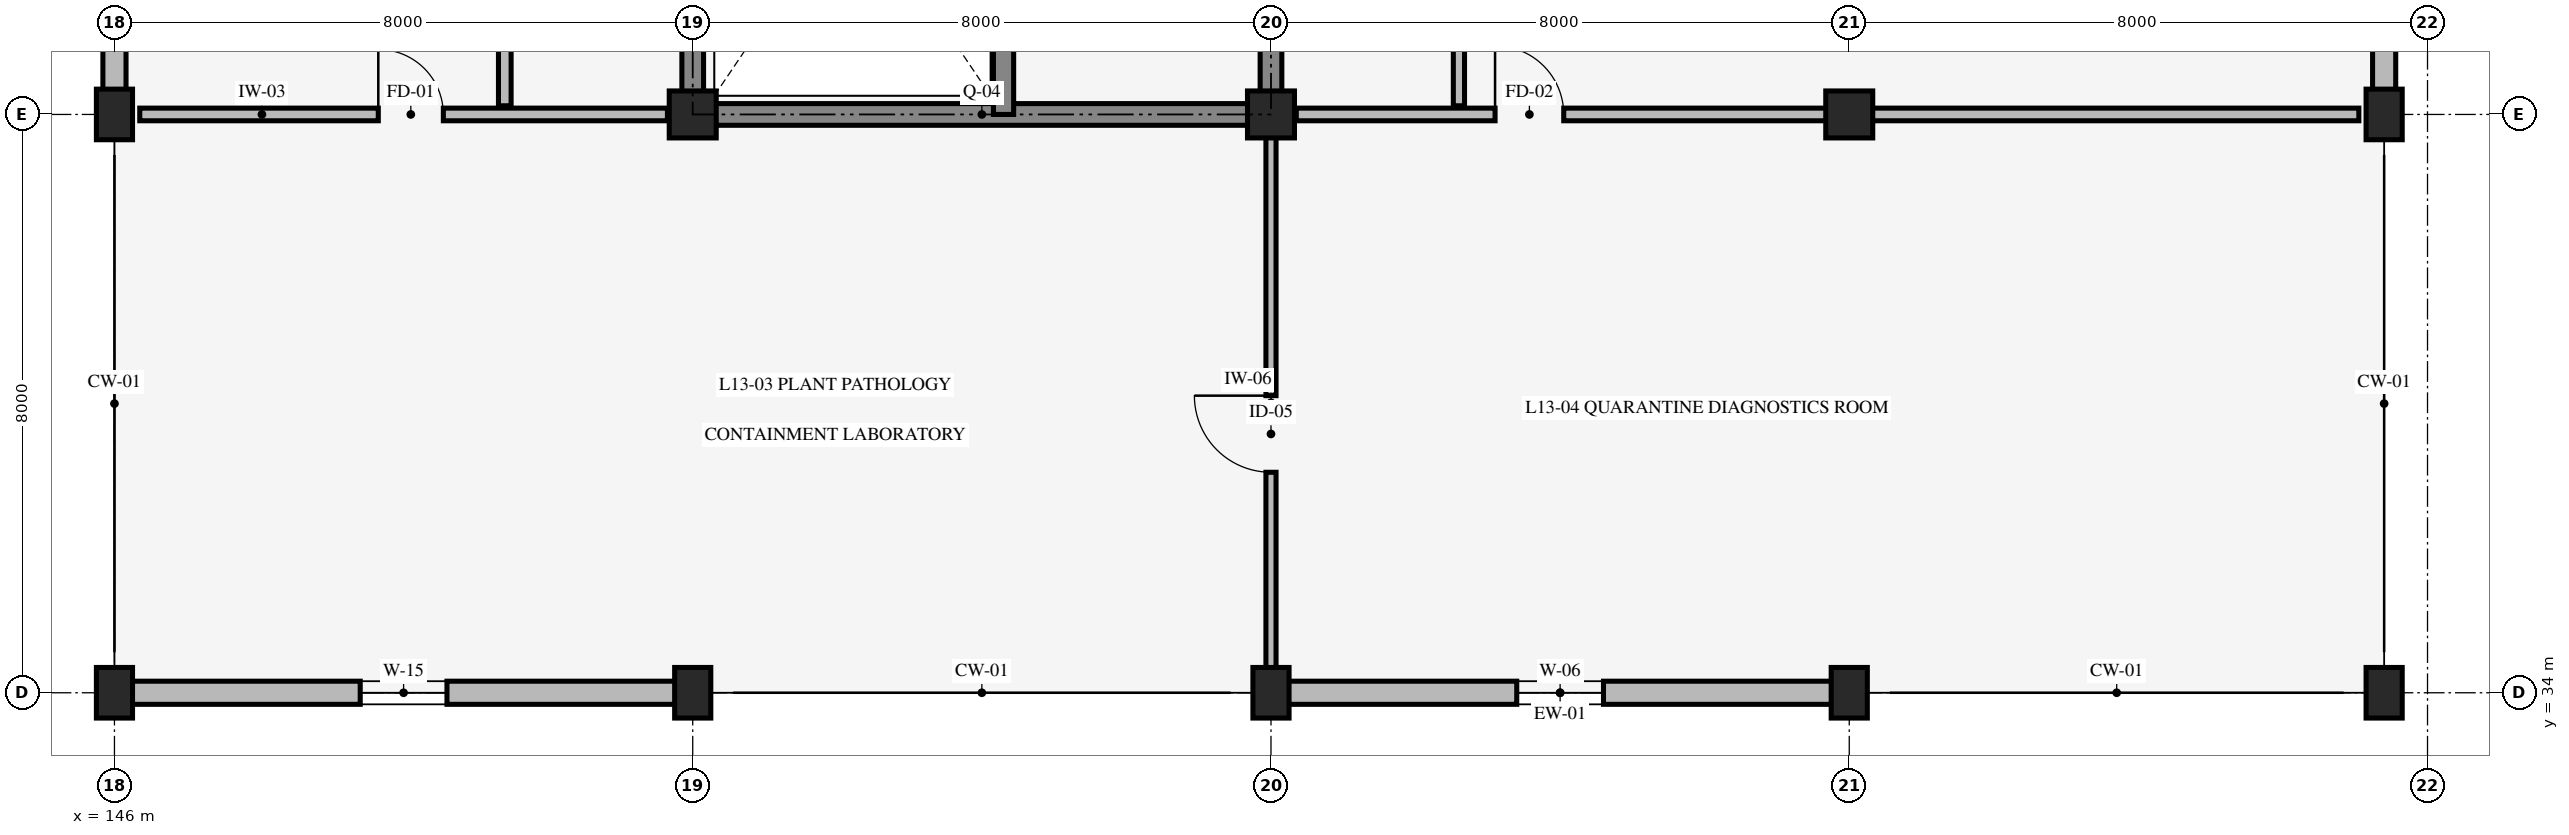
"""IFC4 building model, lengths in metres.
Left out: names, types, materials, properties, quantities, classifications, styles, units other than length and angle.
Written with IfcOpenShell. Run it as: python <this file> out.ifc"""

import sys

from ifc_helpers import new_model, si_unit, direction, frame, frame_2d, origin, origin_2d, place, context, subcontext, project, spatial, rectangle, extrude, element, fill, save


model = new_model("IFC4")
c1 = context("Model", 3, precision=1e-05, world=origin(), true_north=direction((0.0, 1.0)))
c2 = subcontext(c1, "Body", "Model", "MODEL_VIEW")
j1 = project(units=[si_unit("LENGTHUNIT", "METRE"), si_unit("PLANEANGLEUNIT", "RADIAN")], contexts=[c1])
p1 = place(None, origin())
s1 = spatial("IfcSite", under=j1, at=p1, CompositionType="ELEMENT")
p2 = place(p1, origin())
s2 = spatial("IfcBuilding", under=s1, at=p2, CompositionType="ELEMENT")
p3 = place(p2, frame((0.0, 0.0, 52.8)))
s3 = spatial("IfcBuildingStorey", under=s2, at=p3, CompositionType="ELEMENT", Elevation=52.8)
p4 = place(p3, frame((154.0, 42.0, 0.0), z_axis=(0.0, 0.0, 1.0), x_axis=(1.0, 0.0, 0.0)))
e1 = element("IfcWall", 1, at=p4, inside=s3, PredefinedType="SHEAR", context=c2, shape_type="SweptSolid", body=[
    extrude(rectangle(XDim=8.0, YDim=0.3, at=frame_2d((4.0, 0.0))), origin(), (0.0, 0.0, 1.0), 3.95),
])
p5 = place(p3, frame((162.0, 42.0, 0.0), z_axis=(0.0, 0.0, 1.0), x_axis=(0.0, 1.0, 0.0)))
e2 = element("IfcWall", 2, at=p5, inside=s3, PredefinedType="SHEAR", context=c2, shape_type="SweptSolid", body=[
    extrude(rectangle(XDim=8.0, YDim=0.3, at=frame_2d((4.0, 0.0))), origin(), (0.0, 0.0, 1.0), 3.95),
])
p6 = place(p5, frame((3.175, 0.0, 0.0)))
e3 = element("IfcOpeningElement", 3, at=p6, cuts=e2, PredefinedType="OPENING", context=c2, shape_type="SweptSolid", body=[
    extrude(rectangle(XDim=1.05, YDim=2.2, at=frame_2d((0.525, 1.1))), frame((0.0, 0.16, 0.0), z_axis=(0.0, -1.0, 0.0), x_axis=(1.0, 0.0, 0.0)), (0.0, 0.0, 1.0), 0.32),
])
p7 = place(p3, frame((154.0, 50.0, 0.0), z_axis=(0.0, 0.0, 1.0), x_axis=(0.0, -1.0, 0.0)))
e4 = element("IfcWall", 4, at=p7, inside=s3, PredefinedType="SHEAR", context=c2, shape_type="SweptSolid", body=[
    extrude(rectangle(XDim=8.0, YDim=0.3, at=frame_2d((4.0, 0.0))), origin(), (0.0, 0.0, 1.0), 3.95),
])
p8 = place(p3, frame((158.3, 42.0, 0.0), z_axis=(0.0, 0.0, 1.0), x_axis=(0.0, 1.0, 0.0)))
e5 = element("IfcWall", 5, at=p8, inside=s3, PredefinedType="SHEAR", context=c2, shape_type="SweptSolid", body=[
    extrude(rectangle(XDim=8.0, YDim=0.28, at=frame_2d((4.0, 0.0))), origin(), (0.0, 0.0, 1.0), 3.95),
])
for number, where, z_axis, x_axis in (
    (6, (146.0, 34.0, 0.0), (0.0, 0.0, 1.0), (1.0, 0.0, 0.0)),
    (7, (146.0, 42.0, 0.0), (0.0, 0.0, 1.0), (1.0, 0.0, 0.0)),
    (8, (154.0, 34.0, 0.0), (0.0, 0.0, 1.0), (1.0, 0.0, 0.0)),
):
    element("IfcColumn", number, at=place(p3, frame(where, z_axis=z_axis, x_axis=x_axis)), inside=s3, PredefinedType="COLUMN", context=c2, shape_type="SweptSolid", body=[
        extrude(rectangle(XDim=0.5, YDim=0.7, at=origin_2d()), origin(), (0.0, 0.0, 1.0), 4.2),
    ])
p9 = place(p3, frame((154.0, 42.0, 0.0), z_axis=(0.0, 0.0, 1.0), x_axis=(1.0, 0.0, 0.0)))
e9 = element("IfcColumn", 9, at=p9, inside=s3, PredefinedType="COLUMN", context=c2, shape_type="SweptSolid", body=[
    extrude(rectangle(XDim=0.65, YDim=0.65, at=origin_2d()), origin(), (0.0, 0.0, 1.0), 4.2),
])
p10 = place(p3, frame((162.0, 34.0, 0.0), z_axis=(0.0, 0.0, 1.0), x_axis=(1.0, 0.0, 0.0)))
e10 = element("IfcColumn", 10, at=p10, inside=s3, PredefinedType="COLUMN", context=c2, shape_type="SweptSolid", body=[
    extrude(rectangle(XDim=0.5, YDim=0.7, at=origin_2d()), origin(), (0.0, 0.0, 1.0), 4.2),
])
p11 = place(p3, frame((162.0, 42.0, 0.0), z_axis=(0.0, 0.0, 1.0), x_axis=(1.0, 0.0, 0.0)))
e11 = element("IfcColumn", 11, at=p11, inside=s3, PredefinedType="COLUMN", context=c2, shape_type="SweptSolid", body=[
    extrude(rectangle(XDim=0.65, YDim=0.65, at=origin_2d()), origin(), (0.0, 0.0, 1.0), 4.2),
])
p12 = place(p3, frame((170.0, 34.0, 0.0), z_axis=(0.0, 0.0, 1.0), x_axis=(1.0, 0.0, 0.0)))
e12 = element("IfcColumn", 12, at=p12, inside=s3, PredefinedType="COLUMN", context=c2, shape_type="SweptSolid", body=[
    extrude(rectangle(XDim=0.5, YDim=0.7, at=origin_2d()), origin(), (0.0, 0.0, 1.0), 4.2),
])
p13 = place(p3, frame((170.0, 42.0, 0.0), z_axis=(0.0, 0.0, 1.0), x_axis=(1.0, 0.0, 0.0)))
e13 = element("IfcColumn", 13, at=p13, inside=s3, PredefinedType="COLUMN", context=c2, shape_type="SweptSolid", body=[
    extrude(rectangle(XDim=0.65, YDim=0.65, at=origin_2d()), origin(), (0.0, 0.0, 1.0), 4.2),
])
for number, where, z_axis, x_axis in (
    (14, (177.4, 34.0, 0.0), (0.0, 0.0, 1.0), (1.0, 0.0, 0.0)),
    (15, (177.4, 42.0, 0.0), (0.0, 0.0, 1.0), (1.0, 0.0, 0.0)),
):
    element("IfcColumn", number, at=place(p3, frame(where, z_axis=z_axis, x_axis=x_axis)), inside=s3, PredefinedType="COLUMN", context=c2, shape_type="SweptSolid", body=[
        extrude(rectangle(XDim=0.5, YDim=0.7, at=origin_2d()), origin(), (0.0, 0.0, 1.0), 4.2),
    ])
p14 = place(p3, frame((170.0, 34.0, 0.0), z_axis=(0.0, 0.0, 1.0), x_axis=(-1.0, 0.0, 0.0)))
e16 = element("IfcWall", 16, at=p14, inside=s3, PredefinedType="STANDARD", context=c2, shape_type="SweptSolid", body=[
    extrude(rectangle(XDim=8.0, YDim=0.32, at=frame_2d((4.0, 0.0))), origin(), (0.0, 0.0, 1.0), 3.4),
])
p15 = place(p14, frame((3.4, 0.0, 0.85)))
e17 = element("IfcOpeningElement", 17, at=p15, cuts=e16, PredefinedType="OPENING", context=c2, shape_type="SweptSolid", body=[
    extrude(rectangle(XDim=1.2, YDim=1.2, at=frame_2d((0.6, 0.6))), frame((0.0, 0.17, 0.0), z_axis=(0.0, -1.0, 0.0), x_axis=(1.0, 0.0, 0.0)), (0.0, 0.0, 1.0), 0.34),
])
p16 = place(p3, frame((154.0, 34.0, 0.0), z_axis=(0.0, 0.0, 1.0), x_axis=(-1.0, 0.0, 0.0)))
e18 = element("IfcWall", 18, at=p16, inside=s3, PredefinedType="STANDARD", context=c2, shape_type="SweptSolid", body=[
    extrude(rectangle(XDim=8.0, YDim=0.32, at=frame_2d((4.0, 0.0))), origin(), (0.0, 0.0, 1.0), 3.4),
])
p17 = place(p16, frame((3.4, 0.0, 0.85)))
e19 = element("IfcOpeningElement", 19, at=p17, cuts=e18, PredefinedType="OPENING", context=c2, shape_type="SweptSolid", body=[
    extrude(rectangle(XDim=1.2, YDim=1.8, at=frame_2d((0.6, 0.9))), frame((0.0, 0.17, 0.0), z_axis=(0.0, -1.0, 0.0), x_axis=(1.0, 0.0, 0.0)), (0.0, 0.0, 1.0), 0.34),
])
p18 = place(p3, frame((146.0, 42.0, 0.0), z_axis=(0.0, 0.0, 1.0), x_axis=(0.0, 1.0, 0.0)))
e20 = element("IfcWall", 20, at=p18, inside=s3, PredefinedType="STANDARD", context=c2, shape_type="SweptSolid", body=[
    extrude(rectangle(XDim=8.0, YDim=0.32, at=frame_2d((4.0, 0.0))), origin(), (0.0, 0.0, 1.0), 3.34),
])
p19 = place(p18, frame((3.5, 0.0, 0.85)))
e21 = element("IfcOpeningElement", 21, at=p19, cuts=e20, PredefinedType="OPENING", context=c2, shape_type="SweptSolid", body=[
    extrude(rectangle(XDim=1.0, YDim=1.5, at=frame_2d((0.5, 0.75))), frame((0.0, 0.17, 0.0), z_axis=(0.0, -1.0, 0.0), x_axis=(1.0, 0.0, 0.0)), (0.0, 0.0, 1.0), 0.34),
])
p20 = place(p3, frame((177.4, 50.0, 0.0), z_axis=(0.0, 0.0, 1.0), x_axis=(0.0, -1.0, 0.0)))
e22 = element("IfcWall", 22, at=p20, inside=s3, PredefinedType="STANDARD", context=c2, shape_type="SweptSolid", body=[
    extrude(rectangle(XDim=8.0, YDim=0.32, at=frame_2d((4.0, 0.0))), origin(), (0.0, 0.0, 1.0), 3.34),
])
p21 = place(p20, frame((2.55, 0.0, 0.85)))
e23 = element("IfcOpeningElement", 23, at=p21, cuts=e22, PredefinedType="OPENING", context=c2, shape_type="SweptSolid", body=[
    extrude(rectangle(XDim=2.9, YDim=1.7, at=frame_2d((1.45, 0.85))), frame((0.0, 0.17, 0.0), z_axis=(0.0, -1.0, 0.0), x_axis=(1.0, 0.0, 0.0)), (0.0, 0.0, 1.0), 0.34),
])
p22 = place(p3, frame((151.4, 42.12, 0.0), z_axis=(0.0, 0.0, 1.0), x_axis=(0.0, 1.0, 0.0)))
e24 = element("IfcWall", 24, at=p22, inside=s3, PredefinedType="STANDARD", context=c2, shape_type="SweptSolid", body=[
    extrude(rectangle(XDim=7.76, YDim=0.175, at=frame_2d((3.88, 0.0))), origin(), (0.0, 0.0, 1.0), 3.9),
])
p23 = place(p22, frame((3.08, 0.0, 0.0)))
e25 = element("IfcOpeningElement", 25, at=p23, cuts=e24, PredefinedType="OPENING", context=c2, shape_type="SweptSolid", body=[
    extrude(rectangle(XDim=1.6, YDim=2.25, at=frame_2d((0.8, 1.125))), frame((0.0, 0.098, 0.0), z_axis=(0.0, -1.0, 0.0), x_axis=(1.0, 0.0, 0.0)), (0.0, 0.0, 1.0), 0.195),
])
p24 = place(p3, frame((164.6, 42.12, 0.0), z_axis=(0.0, 0.0, 1.0), x_axis=(0.0, 1.0, 0.0)))
e26 = element("IfcWall", 26, at=p24, inside=s3, PredefinedType="STANDARD", context=c2, shape_type="SweptSolid", body=[
    extrude(rectangle(XDim=7.8, YDim=0.155, at=frame_2d((3.9, 0.0))), origin(), (0.0, 0.0, 1.0), 3.9),
])
p25 = place(p24, frame((3.225, 0.0, 0.0)))
e27 = element("IfcOpeningElement", 27, at=p25, cuts=e26, PredefinedType="OPENING", context=c2, shape_type="SweptSolid", body=[
    extrude(rectangle(XDim=1.35, YDim=2.15, at=frame_2d((0.675, 1.075))), frame((0.0, 0.087, 0.0), z_axis=(0.0, -1.0, 0.0), x_axis=(1.0, 0.0, 0.0)), (0.0, 0.0, 1.0), 0.175),
])
p26 = place(p3, frame((146.35, 42.0, 0.0), z_axis=(0.0, 0.0, 1.0), x_axis=(1.0, 0.0, 0.0)))
e28 = element("IfcWall", 28, at=p26, inside=s3, PredefinedType="STANDARD", context=c2, shape_type="SweptSolid", body=[
    extrude(rectangle(XDim=7.3, YDim=0.175, at=frame_2d((3.65, 0.0))), origin(), (0.0, 0.0, 1.0), 3.19),
])
p27 = place(p26, frame((3.3, 0.0, 0.0)))
e29 = element("IfcOpeningElement", 29, at=p27, cuts=e28, PredefinedType="OPENING", context=c2, shape_type="SweptSolid", body=[
    extrude(rectangle(XDim=0.9, YDim=2.1, at=frame_2d((0.45, 1.05))), frame((0.0, 0.098, 0.0), z_axis=(0.0, -1.0, 0.0), x_axis=(1.0, 0.0, 0.0)), (0.0, 0.0, 1.0), 0.195),
])
p28 = place(p3, frame((162.0, 34.05, 0.0), z_axis=(0.0, 0.0, 1.0), x_axis=(0.0, 1.0, 0.0)))
e30 = element("IfcWall", 30, at=p28, inside=s3, PredefinedType="STANDARD", context=c2, shape_type="SweptSolid", body=[
    extrude(rectangle(XDim=7.83, YDim=0.14, at=frame_2d((3.915, 0.0))), origin(), (0.0, 0.0, 1.0), 3.9),
])
p29 = place(p28, frame((3.0, 0.0, 0.0)))
e31 = element("IfcOpeningElement", 31, at=p29, cuts=e30, PredefinedType="OPENING", context=c2, shape_type="SweptSolid", body=[
    extrude(rectangle(XDim=1.06, YDim=2.12, at=frame_2d((0.53, 1.06))), frame((0.0, 0.08, 0.0), z_axis=(0.0, -1.0, 0.0), x_axis=(1.0, 0.0, 0.0)), (0.0, 0.0, 1.0), 0.16),
])
p30 = place(p3, frame((162.35, 42.0, 0.0), z_axis=(0.0, 0.0, 1.0), x_axis=(1.0, 0.0, 0.0)))
e32 = element("IfcWall", 32, at=p30, inside=s3, PredefinedType="STANDARD", context=c2, shape_type="SweptSolid", body=[
    extrude(rectangle(XDim=14.7, YDim=0.175, at=frame_2d((7.35, 0.0))), origin(), (0.0, 0.0, 1.0), 3.29),
])
p31 = place(p30, frame((2.75, 0.0, 0.0)))
e33 = element("IfcOpeningElement", 33, at=p31, cuts=e32, PredefinedType="OPENING", context=c2, shape_type="SweptSolid", body=[
    extrude(rectangle(XDim=0.95, YDim=2.1, at=frame_2d((0.475, 1.05))), frame((0.0, 0.098, 0.0), z_axis=(0.0, -1.0, 0.0), x_axis=(1.0, 0.0, 0.0)), (0.0, 0.0, 1.0), 0.195),
])
p32 = place(p15, origin())
e34 = element("IfcWindow", 34, at=p32, inside=s3, PartitioningType="SINGLE_PANEL", PredefinedType="WINDOW", context=c2, shape_type="SweptSolid", body=[
    extrude(rectangle(XDim=1.2, YDim=1.2, at=frame_2d((0.6, 0.6))), frame((0.0, 0.03, 0.0), z_axis=(0.0, -1.0, 0.0), x_axis=(1.0, 0.0, 0.0)), (0.0, 0.0, 1.0), 0.06),
])
fill(e17, e34)
p33 = place(p17, origin())
e35 = element("IfcWindow", 35, at=p33, inside=s3, PartitioningType="SINGLE_PANEL", PredefinedType="WINDOW", context=c2, shape_type="SweptSolid", body=[
    extrude(rectangle(XDim=1.2, YDim=1.8, at=frame_2d((0.6, 0.9))), frame((0.0, 0.03, 0.0), z_axis=(0.0, -1.0, 0.0), x_axis=(1.0, 0.0, 0.0)), (0.0, 0.0, 1.0), 0.06),
])
fill(e19, e35)
p34 = place(p27, origin())
e36 = element("IfcDoor", 36, at=p34, inside=s3, OperationType="SINGLE_SWING_LEFT", PredefinedType="DOOR", context=c2, shape_type="SweptSolid", body=[
    extrude(rectangle(XDim=0.9, YDim=2.1, at=frame_2d((0.45, 1.05))), frame((0.0, 0.025, 0.0), z_axis=(0.0, -1.0, 0.0), x_axis=(1.0, 0.0, 0.0)), (0.0, 0.0, 1.0), 0.05),
])
fill(e29, e36)
p35 = place(p29, origin())
e37 = element("IfcDoor", 37, at=p35, inside=s3, OperationType="SINGLE_SWING_RIGHT", PredefinedType="DOOR", context=c2, shape_type="SweptSolid", body=[
    extrude(rectangle(XDim=1.06, YDim=2.12, at=frame_2d((0.53, 1.06))), frame((0.0, 0.025, 0.0), z_axis=(0.0, -1.0, 0.0), x_axis=(1.0, 0.0, 0.0)), (0.0, 0.0, 1.0), 0.05),
])
fill(e31, e37)
p36 = place(p31, origin())
e38 = element("IfcDoor", 38, at=p36, inside=s3, OperationType="SINGLE_SWING_LEFT", PredefinedType="DOOR", context=c2, shape_type="SweptSolid", body=[
    extrude(rectangle(XDim=0.95, YDim=2.1, at=frame_2d((0.475, 1.05))), frame((0.0, 0.025, 0.0), z_axis=(0.0, -1.0, 0.0), x_axis=(1.0, 0.0, 0.0)), (0.0, 0.0, 1.0), 0.05),
])
fill(e33, e38)
save(model, sys.argv[1])
